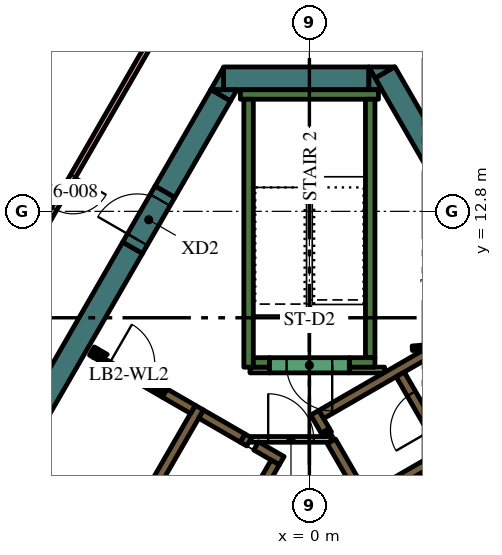
"""IFC4 building model, lengths in metres.
Left out: names, types, materials, properties, quantities, classifications, styles, units other than length and angle.
Written with IfcOpenShell. Run it as: python <this file> out.ifc"""

import sys

from ifc_helpers import new_model, si_unit, direction, frame, frame_2d, origin, place, context, subcontext, project, spatial, polyline, rectangle, outline, extrude, element, fill, save


model = new_model("IFC4")
c1 = context("Model", 3, precision=1e-05, world=origin(), true_north=direction((0.0, 1.0)))
c2 = subcontext(c1, "Body", "Model", "MODEL_VIEW")
j1 = project(units=[si_unit("LENGTHUNIT", "METRE"), si_unit("PLANEANGLEUNIT", "RADIAN")], contexts=[c1])
p1 = place(None, origin())
s1 = spatial("IfcSite", under=j1, at=p1, CompositionType="ELEMENT")
p2 = place(p1, origin())
s2 = spatial("IfcBuilding", under=s1, at=p2, CompositionType="ELEMENT")
p3 = place(p2, frame((0.0, 0.0, 327.6)))
s3 = spatial("IfcBuildingStorey", under=s2, at=p3, CompositionType="ELEMENT", Elevation=327.6)
p4 = place(p3, frame((1.989, 16.456, 0.0), z_axis=(0.0, 0.0, 1.0), x_axis=(0.49999102663, -0.8660305845, 0.0)))
e1 = element("IfcWall", 1, at=p4, inside=s3, PredefinedType="SOLIDWALL", context=c2, shape_type="SweptSolid", body=[
    extrude(rectangle(XDim=12.406, YDim=0.6, at=frame_2d((6.203, 0.0))), origin(), (0.0, 0.0, 1.0), 4.2),
])
p5 = place(p3, origin())
e2 = element("IfcWall", 2, at=p5, inside=s3, PredefinedType="SOLIDWALL", context=c2, shape_type="SweptSolid", body=[
    extrude(outline(polyline([(1.559, 16.6), (2.235, 16.6), (1.728, 16.307), (1.559, 16.6)])), origin(), (0.0, 0.0, 1.0), 4.2),
])
p6 = place(p3, frame((-2.258, 16.3, 0.0), z_axis=(0.0, 0.0, 1.0), x_axis=(1.0, 0.0, 0.0)))
e3 = element("IfcWall", 3, at=p6, inside=s3, PredefinedType="SOLIDWALL", context=c2, shape_type="SweptSolid", body=[
    extrude(rectangle(XDim=3.823, YDim=0.6, at=frame_2d((1.912, 0.0))), origin(), (0.0, 0.0, 1.0), 4.2),
])
e4 = element("IfcWall", 4, at=p5, inside=s3, PredefinedType="SOLIDWALL", context=c2, shape_type="SweptSolid", body=[
    extrude(outline(polyline([(1.905, 16.0), (1.567, 16.0), (1.567, 16.585), (1.905, 16.0)])), origin(), (0.0, 0.0, 1.0), 4.2),
])
e5 = element("IfcWall", 5, at=p5, inside=s3, PredefinedType="SOLIDWALL", context=c2, shape_type="SweptSolid", body=[
    extrude(outline(polyline([(-2.598, 16.0), (-2.26, 16.585), (-2.26, 16.0), (-2.598, 16.0)])), origin(), (0.0, 0.0, 1.0), 4.2),
])
p7 = place(p3, frame((-2.335, 15.855, 0.0), z_axis=(0.0, 0.0, 1.0), x_axis=(-0.499960127962, -0.866048422692, 0.0)))
e6 = element("IfcWall", 6, at=p7, inside=s3, PredefinedType="SOLIDWALL", context=c2, shape_type="SweptSolid", body=[
    extrude(rectangle(XDim=2.934, YDim=0.6, at=frame_2d((1.467, 0.0))), origin(), (0.0, 0.0, 1.0), 4.2),
])
e7 = element("IfcWall", 7, at=p5, inside=s3, PredefinedType="SOLIDWALL", context=c2, shape_type="SweptSolid", body=[
    extrude(outline(polyline([(-1.905, 16.0), (-2.074, 15.707), (-2.581, 16.0), (-1.905, 16.0)])), origin(), (0.0, 0.0, 1.0), 4.2),
])
p8 = place(p3, frame((-4.652, 11.842, 0.0), z_axis=(0.0, 0.0, 1.0), x_axis=(-0.500003640647, -0.866023301845, 0.0)))
e8 = element("IfcWall", 8, at=p8, inside=s3, PredefinedType="SOLIDWALL", context=c2, shape_type="SweptSolid", body=[
    extrude(rectangle(XDim=15.858, YDim=0.6, at=frame_2d((7.929, 0.0))), origin(), (0.0, 0.0, 1.0), 4.2),
])
p9 = place(p3, frame((-1.817, 15.875, 0.0), z_axis=(0.0, 0.0, 1.0), x_axis=(1.0, 0.0, 0.0)))
e9 = element("IfcWall", 9, at=p9, inside=s3, PredefinedType="SOLIDWALL", context=c2, shape_type="SweptSolid", body=[
    extrude(rectangle(XDim=3.634, YDim=0.25, at=frame_2d((1.817, 0.0))), origin(), (0.0, 0.0, 1.0), 4.2),
])
p10 = place(p3, frame((1.6, 8.95, 0.0), z_axis=(0.0, 0.0, 1.0), x_axis=(0.0, 1.0, 0.0)))
e10 = element("IfcWall", 10, at=p10, inside=s3, PredefinedType="SOLIDWALL", context=c2, shape_type="SweptSolid", body=[
    extrude(rectangle(XDim=6.8, YDim=0.25, at=frame_2d((3.4, 0.0))), origin(), (0.0, 0.0, 1.0), 4.2),
])
p11 = place(p3, frame((1.05, 8.825, 0.0), z_axis=(0.0, 0.0, 1.0), x_axis=(1.0, 0.0, 0.0)))
e11 = element("IfcWall", 11, at=p11, inside=s3, PredefinedType="SOLIDWALL", context=c2, shape_type="SweptSolid", body=[
    extrude(rectangle(XDim=0.675, YDim=0.25, at=frame_2d((0.337, 0.0))), origin(), (0.0, 0.0, 1.0), 4.2),
])
p12 = place(p3, frame((-1.6, 8.7, 0.0), z_axis=(0.0, 0.0, 1.0), x_axis=(0.0, 1.0, 0.0)))
e12 = element("IfcWall", 12, at=p12, inside=s3, PredefinedType="SOLIDWALL", context=c2, shape_type="SweptSolid", body=[
    extrude(rectangle(XDim=7.05, YDim=0.25, at=frame_2d((3.525, 0.0))), origin(), (0.0, 0.0, 1.0), 4.2),
])
p13 = place(p3, frame((-1.475, 8.825, 0.0), z_axis=(0.0, 0.0, 1.0), x_axis=(1.0, 0.0, 0.0)))
e13 = element("IfcWall", 13, at=p13, inside=s3, PredefinedType="SOLIDWALL", context=c2, shape_type="SweptSolid", body=[
    extrude(rectangle(XDim=0.425, YDim=0.25, at=frame_2d((0.212, 0.0))), origin(), (0.0, 0.0, 1.0), 4.2),
])
p14 = place(p3, frame((0.473, 6.93, 0.0), z_axis=(0.0, 0.0, 1.0), x_axis=(-0.49972245349, 0.866185586049, 0.0)))
e14 = element("IfcWall", 14, at=p14, inside=s3, PredefinedType="SOLIDWALL", context=c2, shape_type="SweptSolid", body=[
    extrude(rectangle(XDim=0.11, YDim=0.25, at=frame_2d((0.055, 0.0))), origin(), (0.0, 0.0, 1.0), 4.2),
])
p15 = place(p3, frame((6.568, -3.627, 0.0), z_axis=(0.0, 0.0, 1.0), x_axis=(-0.499999455981, 0.866025717874, 0.0)))
e15 = element("IfcWall", 15, at=p15, inside=s3, PredefinedType="SOLIDWALL", context=c2, shape_type="SweptSolid", body=[
    extrude(rectangle(XDim=11.978, YDim=0.25, at=frame_2d((5.989, 0.0))), origin(), (0.0, 0.0, 1.0), 4.2),
])
p16 = place(p3, frame((0.417, 7.027, 0.0), z_axis=(0.0, 0.0, 1.0), x_axis=(-0.500210807569, 0.865903659763, 0.0)))
e16 = element("IfcWall", 16, at=p16, inside=s3, PredefinedType="SOLIDWALL", context=c2, shape_type="SweptSolid", body=[
    extrude(rectangle(XDim=0.548, YDim=0.25, at=frame_2d((0.274, 0.0))), origin(), (0.0, 0.0, 1.0), 4.2),
])
p17 = place(p3, frame((3.1, 9.064, 0.0), z_axis=(0.0, 0.0, 1.0), x_axis=(-0.866030133475, -0.499991807846, 0.0)))
e17 = element("IfcWall", 17, at=p17, inside=s3, PredefinedType="SOLIDWALL", context=c2, shape_type="SweptSolid", body=[
    extrude(rectangle(XDim=3.217, YDim=0.25, at=frame_2d((1.608, 0.0))), origin(), (0.0, 0.0, 1.0), 4.2),
])
p18 = place(p3, frame((1.574, 5.274, 0.0), z_axis=(0.0, 0.0, 1.0), x_axis=(0.866028486751, 0.499994660107, 0.0)))
e18 = element("IfcWall", 18, at=p18, inside=s3, PredefinedType="SOLIDWALL", context=c2, shape_type="SweptSolid", body=[
    extrude(rectangle(XDim=2.2, YDim=0.25, at=frame_2d((1.1, 0.0))), origin(), (0.0, 0.0, 1.0), 4.2),
])
p19 = place(p3, frame((-8.06, -1.311, 0.0), z_axis=(0.0, 0.0, 1.0), x_axis=(0.50000273126, 0.866023826885, 0.0)))
e19 = element("IfcWall", 19, at=p19, inside=s3, PredefinedType="SOLIDWALL", context=c2, shape_type="SweptSolid", body=[
    extrude(rectangle(XDim=10.33, YDim=0.25, at=frame_2d((5.165, 0.0))), origin(), (0.0, 0.0, 1.0), 4.2),
])
p20 = place(p3, frame((-1.758, 6.835, 0.0), z_axis=(0.0, 0.0, 1.0), x_axis=(0.865982457891, -0.500074377092, 0.0)))
e20 = element("IfcWall", 20, at=p20, inside=s3, PredefinedType="SOLIDWALL", context=c2, shape_type="SweptSolid", body=[
    extrude(rectangle(XDim=0.2, YDim=0.25, at=frame_2d((0.1, 0.0))), origin(), (0.0, 0.0, 1.0), 4.2),
])
p21 = place(p3, frame((-1.76, 6.836, 0.0), z_axis=(0.0, 0.0, 1.0), x_axis=(-0.865952863304, 0.500125622755, 0.0)))
e21 = element("IfcWall", 21, at=p21, inside=s3, PredefinedType="SOLIDWALL", context=c2, shape_type="SweptSolid", body=[
    extrude(rectangle(XDim=1.258, YDim=0.25, at=frame_2d((0.629, 0.0))), origin(), (0.0, 0.0, 1.0), 4.2),
])
p22 = place(p3, frame((-0.728, 6.24, 0.0), z_axis=(0.0, 0.0, 1.0), x_axis=(-0.865955664968, 0.500120771724, 0.0)))
e22 = element("IfcWall", 22, at=p22, inside=s3, PredefinedType="SOLIDWALL", context=c2, shape_type="SweptSolid", body=[
    extrude(rectangle(XDim=0.778, YDim=0.25, at=frame_2d((0.389, 0.0))), origin(), (0.0, 0.0, 1.0), 4.2),
])
p23 = place(p3, frame((-5.725, 9.125, 0.0), z_axis=(0.0, 0.0, 1.0), x_axis=(0.866185586049, -0.49972245349, 0.0)))
e23 = element("IfcWall", 23, at=p23, inside=s3, PredefinedType="SOLIDWALL", context=c2, shape_type="SweptSolid", body=[
    extrude(rectangle(XDim=0.11, YDim=0.25, at=frame_2d((0.055, 0.0))), origin(), (0.0, 0.0, 1.0), 4.2),
])
p24 = place(p3, frame((-3.066, 7.59, 0.0), z_axis=(0.0, 0.0, 1.0), x_axis=(-0.866081358704, 0.49990307071, 0.0)))
e24 = element("IfcWall", 24, at=p24, inside=s3, PredefinedType="SOLIDWALL", context=c2, shape_type="SweptSolid", body=[
    extrude(rectangle(XDim=0.858, YDim=0.25, at=frame_2d((0.429, 0.0))), origin(), (0.0, 0.0, 1.0), 4.2),
])
e25 = element("IfcWall", 25, at=p5, inside=s3, PredefinedType="SOLIDWALL", context=c2, shape_type="SweptSolid", body=[
    extrude(outline(polyline([(-3.748, 8.128), (-3.813, 8.015), (-4.027, 8.139), (-4.017, 8.156), (-4.008, 8.173), (-4.0, 8.192), (-3.995, 8.21), (-3.991, 8.23), (-3.99, 8.25), (-3.99, 8.268), (-3.748, 8.128)])), origin(), (0.0, 0.0, 1.0), 4.2),
])
e26 = element("IfcWall", 26, at=p5, inside=s3, PredefinedType="SOLIDWALL", context=c2, shape_type="SweptSolid", body=[
    extrude(outline(polyline([(-5.689, 8.96), (-5.69, 8.961), (-5.565, 9.177), (-5.319, 9.035), (-5.335, 9.026), (-5.351, 9.015), (-5.366, 9.002), (-5.379, 8.988), (-5.392, 8.972), (-5.402, 8.956), (-5.412, 8.939), (-5.629, 9.064), (-5.629, 9.064), (-5.689, 8.96)])), origin(), (0.0, 0.0, 1.0), 4.2),
])
p25 = place(p3, frame((1.05, 8.625, 0.0), z_axis=(0.0, 0.0, 1.0), x_axis=(1.0, 0.0, 0.0)))
e27 = element("IfcWall", 27, at=p25, inside=s3, PredefinedType="PARTITIONING", context=c2, shape_type="SweptSolid", body=[
    extrude(rectangle(XDim=0.929, YDim=0.15, at=frame_2d((0.464, 0.0))), origin(), (0.0, 0.0, 1.0), 3.45),
])
p26 = place(p3, frame((-1.564, 8.625, 0.0), z_axis=(0.0, 0.0, 1.0), x_axis=(1.0, 0.0, 0.0)))
e28 = element("IfcWall", 28, at=p26, inside=s3, PredefinedType="PARTITIONING", context=c2, shape_type="SweptSolid", body=[
    extrude(rectangle(XDim=0.514, YDim=0.15, at=frame_2d((0.257, 0.0))), origin(), (0.0, 0.0, 1.0), 3.45),
])
p27 = place(p3, frame((8.565, -2.185, 0.0), z_axis=(0.0, 0.0, 1.0), x_axis=(-0.499997954832, 0.866026584559, 0.0)))
e29 = element("IfcWall", 29, at=p27, inside=s3, PredefinedType="SOLIDWALL", context=c2, shape_type="SweptSolid", body=[
    extrude(rectangle(XDim=12.35, YDim=0.25, at=frame_2d((6.175, 0.0))), origin(), (0.0, 0.0, 1.0), 4.2),
])
p28 = place(p27, frame((0.685, 0.0, 0.0)))
e30 = element("IfcOpeningElement", 30, at=p28, cuts=e29, PredefinedType="OPENING", context=c2, shape_type="SweptSolid", body=[
    extrude(rectangle(XDim=0.9, YDim=2.1, at=frame_2d((0.45, 1.05))), frame((0.0, 0.135, 0.0), z_axis=(0.0, -1.0, 0.0), x_axis=(1.0, 0.0, 0.0)), (0.0, 0.0, 1.0), 0.27),
])
p29 = place(p27, frame((3.105, 0.0, 0.0)))
e31 = element("IfcOpeningElement", 31, at=p29, cuts=e29, PredefinedType="OPENING", context=c2, shape_type="SweptSolid", body=[
    extrude(rectangle(XDim=1.1, YDim=2.1, at=frame_2d((0.55, 1.05))), frame((0.0, 0.135, 0.0), z_axis=(0.0, -1.0, 0.0), x_axis=(1.0, 0.0, 0.0)), (0.0, 0.0, 1.0), 0.27),
])
p30 = place(p27, frame((5.625, 0.0, 0.0)))
e32 = element("IfcOpeningElement", 32, at=p30, cuts=e29, PredefinedType="OPENING", context=c2, shape_type="SweptSolid", body=[
    extrude(rectangle(XDim=1.1, YDim=2.1, at=frame_2d((0.55, 1.05))), frame((0.0, 0.135, 0.0), z_axis=(0.0, -1.0, 0.0), x_axis=(1.0, 0.0, 0.0)), (0.0, 0.0, 1.0), 0.27),
])
p31 = place(p27, frame((8.145, 0.0, 0.0)))
e33 = element("IfcOpeningElement", 33, at=p31, cuts=e29, PredefinedType="OPENING", context=c2, shape_type="SweptSolid", body=[
    extrude(rectangle(XDim=1.1, YDim=2.1, at=frame_2d((0.55, 1.05))), frame((0.0, 0.135, 0.0), z_axis=(0.0, -1.0, 0.0), x_axis=(1.0, 0.0, 0.0)), (0.0, 0.0, 1.0), 0.27),
])
p32 = place(p27, frame((10.665, 0.0, 0.0)))
e34 = element("IfcOpeningElement", 34, at=p32, cuts=e29, PredefinedType="OPENING", context=c2, shape_type="SweptSolid", body=[
    extrude(rectangle(XDim=1.1, YDim=2.1, at=frame_2d((0.55, 1.05))), frame((0.0, 0.135, 0.0), z_axis=(0.0, -1.0, 0.0), x_axis=(1.0, 0.0, 0.0)), (0.0, 0.0, 1.0), 0.27),
])
p33 = place(p3, frame((-0.898, 6.194, 0.0), z_axis=(0.0, 0.0, 1.0), x_axis=(-0.499996202215, -0.866027596426, 0.0)))
e35 = element("IfcWall", 35, at=p33, inside=s3, PredefinedType="SOLIDWALL", context=c2, shape_type="SweptSolid", body=[
    extrude(rectangle(XDim=9.83, YDim=0.25, at=frame_2d((4.915, 0.0))), origin(), (0.0, 0.0, 1.0), 4.2),
])
p34 = place(p33, frame((0.585, 0.0, 0.0)))
e36 = element("IfcOpeningElement", 36, at=p34, cuts=e35, PredefinedType="OPENING", context=c2, shape_type="SweptSolid", body=[
    extrude(rectangle(XDim=1.1, YDim=2.1, at=frame_2d((0.55, 1.05))), frame((0.0, 0.135, 0.0), z_axis=(0.0, -1.0, 0.0), x_axis=(1.0, 0.0, 0.0)), (0.0, 0.0, 1.0), 0.27),
])
p35 = place(p33, frame((3.105, 0.0, 0.0)))
e37 = element("IfcOpeningElement", 37, at=p35, cuts=e35, PredefinedType="OPENING", context=c2, shape_type="SweptSolid", body=[
    extrude(rectangle(XDim=1.1, YDim=2.1, at=frame_2d((0.55, 1.05))), frame((0.0, 0.135, 0.0), z_axis=(0.0, -1.0, 0.0), x_axis=(1.0, 0.0, 0.0)), (0.0, 0.0, 1.0), 0.27),
])
p36 = place(p33, frame((5.625, 0.0, 0.0)))
e38 = element("IfcOpeningElement", 38, at=p36, cuts=e35, PredefinedType="OPENING", context=c2, shape_type="SweptSolid", body=[
    extrude(rectangle(XDim=1.1, YDim=2.1, at=frame_2d((0.55, 1.05))), frame((0.0, 0.135, 0.0), z_axis=(0.0, -1.0, 0.0), x_axis=(1.0, 0.0, 0.0)), (0.0, 0.0, 1.0), 0.27),
])
p37 = place(p33, frame((8.145, 0.0, 0.0)))
e39 = element("IfcOpeningElement", 39, at=p37, cuts=e35, PredefinedType="OPENING", context=c2, shape_type="SweptSolid", body=[
    extrude(rectangle(XDim=1.1, YDim=2.1, at=frame_2d((0.55, 1.05))), frame((0.0, 0.135, 0.0), z_axis=(0.0, -1.0, 0.0), x_axis=(1.0, 0.0, 0.0)), (0.0, 0.0, 1.0), 0.27),
])
p38 = place(p3, frame((1.05, 8.75, 0.0), z_axis=(0.0, 0.0, 1.0), x_axis=(-1.0, 0.0, 0.0)))
e40 = element("IfcWall", 40, at=p38, inside=s3, PredefinedType="SOLIDWALL", context=c2, shape_type="SweptSolid", body=[
    extrude(rectangle(XDim=2.1, YDim=0.4, at=frame_2d((1.05, 0.0))), origin(), (0.0, 0.0, 1.0), 4.2),
])
p39 = place(p38, frame((0.45, 0.0, 0.0)))
e41 = element("IfcOpeningElement", 41, at=p39, cuts=e40, PredefinedType="OPENING", context=c2, shape_type="SweptSolid", body=[
    extrude(rectangle(XDim=1.2, YDim=2.1, at=frame_2d((0.6, 1.05))), frame((0.0, 0.21, 0.0), z_axis=(0.0, -1.0, 0.0), x_axis=(1.0, 0.0, 0.0)), (0.0, 0.0, 1.0), 0.42),
])
p40 = place(p3, frame((5.398, 9.419, 0.0), z_axis=(0.0, 0.0, 1.0), x_axis=(-0.996653416376, -0.081743303248, 0.0)))
e42 = element("IfcWall", 42, at=p40, inside=s3, PredefinedType="PARTITIONING", context=c2, shape_type="SweptSolid", body=[
    extrude(rectangle(XDim=2.7, YDim=0.12, at=frame_2d((1.35, 0.0))), origin(), (0.0, 0.0, 1.0), 3.45),
])
p41 = place(p40, frame((1.45, 0.0, 0.0)))
e43 = element("IfcOpeningElement", 43, at=p41, cuts=e42, PredefinedType="OPENING", context=c2, shape_type="SweptSolid", body=[
    extrude(rectangle(XDim=0.9, YDim=2.1, at=frame_2d((0.45, 1.05))), frame((0.0, 0.07, 0.0), z_axis=(0.0, -1.0, 0.0), x_axis=(1.0, 0.0, 0.0)), (0.0, 0.0, 1.0), 0.14),
])
p42 = place(p3, frame((-1.534, 6.8, 0.0), z_axis=(0.0, 0.0, 1.0), x_axis=(1.0, 0.0, 0.0)))
e44 = element("IfcWall", 44, at=p42, inside=s3, PredefinedType="PARTITIONING", context=c2, shape_type="SweptSolid", body=[
    extrude(rectangle(XDim=2.1, YDim=0.15, at=frame_2d((1.05, 0.0))), origin(), (0.0, 0.0, 1.0), 3.45),
])
p43 = place(p42, frame((0.45, 0.0, 0.0)))
e45 = element("IfcOpeningElement", 45, at=p43, cuts=e44, PredefinedType="OPENING", context=c2, shape_type="SweptSolid", body=[
    extrude(rectangle(XDim=1.2, YDim=2.1, at=frame_2d((0.6, 1.05))), frame((0.0, 0.085, 0.0), z_axis=(0.0, -1.0, 0.0), x_axis=(1.0, 0.0, 0.0)), (0.0, 0.0, 1.0), 0.17),
])
p44 = place(p3, frame((-5.659, 9.012, 0.0), z_axis=(0.0, 0.0, 1.0), x_axis=(0.866009402589, -0.500027713859, 0.0)))
e46 = element("IfcWall", 46, at=p44, inside=s3, PredefinedType="PARTITIONING", context=c2, shape_type="SweptSolid", body=[
    extrude(rectangle(XDim=2.1, YDim=0.12, at=frame_2d((1.05, 0.0))), origin(), (0.0, 0.0, 1.0), 3.45),
])
p45 = place(p44, frame((0.45, 0.0, 0.0)))
e47 = element("IfcOpeningElement", 47, at=p45, cuts=e46, PredefinedType="OPENING", context=c2, shape_type="SweptSolid", body=[
    extrude(rectangle(XDim=1.2, YDim=2.1, at=frame_2d((0.6, 1.05))), frame((0.0, 0.07, 0.0), z_axis=(0.0, -1.0, 0.0), x_axis=(1.0, 0.0, 0.0)), (0.0, 0.0, 1.0), 0.14),
])
p46 = place(p3, frame((-4.652, 11.842, 0.0), z_axis=(0.0, 0.0, 1.0), x_axis=(0.500062241894, 0.865989465428, 0.0)))
e48 = element("IfcWall", 48, at=p46, inside=s3, PredefinedType="SOLIDWALL", context=c2, shape_type="SweptSolid", body=[
    extrude(rectangle(XDim=1.7, YDim=0.6, at=frame_2d((0.85, 0.0))), origin(), (0.0, 0.0, 1.0), 4.2),
])
p47 = place(p46, frame((0.25, 0.0, 0.0)))
e49 = element("IfcOpeningElement", 49, at=p47, cuts=e48, PredefinedType="OPENING", context=c2, shape_type="SweptSolid", body=[
    extrude(rectangle(XDim=1.2, YDim=2.1, at=frame_2d((0.6, 1.05))), frame((0.0, 0.31, 0.0), z_axis=(0.0, -1.0, 0.0), x_axis=(1.0, 0.0, 0.0)), (0.0, 0.0, 1.0), 0.62),
])
p48 = place(p3, frame((-3.406, 18.6, 0.0), z_axis=(0.0, 0.0, 1.0), x_axis=(-0.499991334387, -0.866030406821, 0.0)))
e50 = element("IfcWall", 50, at=p48, inside=s3, PredefinedType="PARTITIONING", context=c2, shape_type="SweptSolid", body=[
    extrude(rectangle(XDim=12.235, YDim=0.15, at=frame_2d((6.118, 0.0))), origin(), (0.0, 0.0, 1.0), 3.45),
])
p49 = place(p48, frame((5.617, 0.0, 0.0)))
e51 = element("IfcOpeningElement", 51, at=p49, cuts=e50, PredefinedType="OPENING", context=c2, shape_type="SweptSolid", body=[
    extrude(rectangle(XDim=1.0, YDim=2.1, at=frame_2d((0.5, 1.05))), frame((0.0, 0.085, 0.0), z_axis=(0.0, -1.0, 0.0), x_axis=(1.0, 0.0, 0.0)), (0.0, 0.0, 1.0), 0.17),
])
p50 = place(p3, frame((-6.808, 17.908, 0.0), z_axis=(0.0, 0.0, 1.0), x_axis=(-0.499977492351, -0.866038398192, 0.0)))
e52 = element("IfcWall", 52, at=p50, inside=s3, PredefinedType="SOLIDWALL", context=c2, shape_type="SweptSolid", body=[
    extrude(rectangle(XDim=1.464, YDim=0.3, at=frame_2d((0.732, 0.0))), origin(), (0.0, 0.0, 1.0), 3.95),
])
p51 = place(p32, origin())
e53 = element("IfcDoor", 53, at=p51, inside=s3, OperationType="DOUBLE_DOOR_SLIDING", PredefinedType="DOOR", context=c2, shape_type="SweptSolid", body=[
    extrude(rectangle(XDim=1.1, YDim=2.1, at=frame_2d((0.55, 1.05))), frame((0.0, 0.025, 0.0), z_axis=(0.0, -1.0, 0.0), x_axis=(1.0, 0.0, 0.0)), (0.0, 0.0, 1.0), 0.05),
])
fill(e34, e53)
p52 = place(p39, origin())
e54 = element("IfcDoor", 54, at=p52, inside=s3, OperationType="SINGLE_SWING_LEFT", PredefinedType="DOOR", context=c2, shape_type="SweptSolid", body=[
    extrude(rectangle(XDim=1.2, YDim=2.1, at=frame_2d((0.6, 1.05))), frame((0.0, 0.025, 0.0), z_axis=(0.0, -1.0, 0.0), x_axis=(1.0, 0.0, 0.0)), (0.0, 0.0, 1.0), 0.05),
])
fill(e41, e54)
p53 = place(p43, origin())
e55 = element("IfcDoor", 55, at=p53, inside=s3, OperationType="SINGLE_SWING_LEFT", PredefinedType="DOOR", context=c2, shape_type="SweptSolid", body=[
    extrude(rectangle(XDim=1.2, YDim=2.1, at=frame_2d((0.6, 1.05))), frame((0.0, 0.025, 0.0), z_axis=(0.0, -1.0, 0.0), x_axis=(1.0, 0.0, 0.0)), (0.0, 0.0, 1.0), 0.05),
])
fill(e45, e55)
p54 = place(p45, origin())
e56 = element("IfcDoor", 56, at=p54, inside=s3, OperationType="SINGLE_SWING_LEFT", PredefinedType="DOOR", context=c2, shape_type="SweptSolid", body=[
    extrude(rectangle(XDim=1.2, YDim=2.1, at=frame_2d((0.6, 1.05))), frame((0.0, 0.025, 0.0), z_axis=(0.0, -1.0, 0.0), x_axis=(1.0, 0.0, 0.0)), (0.0, 0.0, 1.0), 0.05),
])
fill(e47, e56)
p55 = place(p47, origin())
e57 = element("IfcDoor", 57, at=p55, inside=s3, OperationType="SINGLE_SWING_LEFT", PredefinedType="DOOR", context=c2, shape_type="SweptSolid", body=[
    extrude(rectangle(XDim=1.2, YDim=2.1, at=frame_2d((0.6, 1.05))), frame((0.0, 0.025, 0.0), z_axis=(0.0, -1.0, 0.0), x_axis=(1.0, 0.0, 0.0)), (0.0, 0.0, 1.0), 0.05),
])
fill(e49, e57)
p56 = place(p49, origin())
e58 = element("IfcDoor", 58, at=p56, inside=s3, OperationType="SINGLE_SWING_RIGHT", PredefinedType="DOOR", context=c2, shape_type="SweptSolid", body=[
    extrude(rectangle(XDim=1.0, YDim=2.1, at=frame_2d((0.5, 1.05))), frame((0.0, 0.025, 0.0), z_axis=(0.0, -1.0, 0.0), x_axis=(1.0, 0.0, 0.0)), (0.0, 0.0, 1.0), 0.05),
])
fill(e51, e58)
save(model, sys.argv[1])
